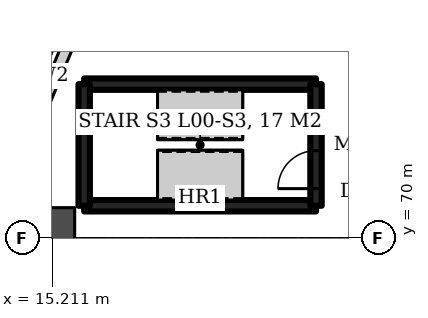
"""IFC4 building model, lengths in metres.
Left out: names, types, materials, properties, quantities, classifications, styles, units other than length and angle.
Written with IfcOpenShell. Run it as: python <this file> out.ifc"""

import sys

from ifc_helpers import new_model, si_unit, direction, frame, frame_2d, origin, origin_2d, place, context, subcontext, project, spatial, rectangle, extrude, element, fill, save


model = new_model("IFC4")
c1 = context("Model", 3, precision=1e-05, world=origin(), true_north=direction((0.0, 1.0)))
c2 = subcontext(c1, "Body", "Model", "MODEL_VIEW")
j1 = project(units=[si_unit("LENGTHUNIT", "METRE"), si_unit("PLANEANGLEUNIT", "RADIAN")], contexts=[c1])
p1 = place(None, origin())
s1 = spatial("IfcSite", under=j1, at=p1, CompositionType="ELEMENT")
p2 = place(p1, origin())
s2 = spatial("IfcBuilding", under=s1, at=p2, CompositionType="ELEMENT")
p3 = place(p2, origin())
s3 = spatial("IfcBuildingStorey", under=s2, at=p3, CompositionType="ELEMENT", Elevation=0.0)
p4 = place(p3, frame((15.0, 70.0, 0.0), z_axis=(0.0, 0.0, 1.0), x_axis=(1.0, 0.0, 0.0)))
e1 = element("IfcColumn", 1, at=p4, inside=s3, PredefinedType="COLUMN", context=c2, shape_type="SweptSolid", body=[
    extrude(rectangle(XDim=1.6, YDim=1.6, at=origin_2d()), origin(), (0.0, 0.0, 1.0), 6.0),
])
p5 = place(p3, frame((15.734, 75.35, 0.0), z_axis=(0.0, 0.0, 1.0), x_axis=(-0.382709424419, -0.923868765822, 0.0)))
e2 = element("IfcWall", 2, at=p5, inside=s3, PredefinedType="SOLIDWALL", context=c2, shape_type="SweptSolid", body=[
    extrude(rectangle(XDim=2.793, YDim=0.3, at=frame_2d((1.397, 0.0))), origin(), (0.0, 0.0, 1.0), 5.7),
])
for number, where, z_axis, x_axis in (
    (3, (16.05, 70.85, 0.0), (0.0, 0.0, 1.0), (1.0, 0.0, 0.0)),
    (4, (16.05, 74.05, 0.0), (0.0, 0.0, 1.0), (1.0, 0.0, 0.0)),
):
    element("IfcWall", number, at=place(p3, frame(where, z_axis=z_axis, x_axis=x_axis)), inside=s3, PredefinedType="SHEAR", context=c2, shape_type="SweptSolid", body=[
        extrude(rectangle(XDim=6.1, YDim=0.3, at=frame_2d((3.05, 0.0))), origin(), (0.0, 0.0, 1.0), 6.0),
    ])
p6 = place(p3, frame((16.05, 70.85, 0.0), z_axis=(0.0, 0.0, 1.0), x_axis=(0.0, 1.0, 0.0)))
e5 = element("IfcWall", 5, at=p6, inside=s3, PredefinedType="SHEAR", context=c2, shape_type="SweptSolid", body=[
    extrude(rectangle(XDim=3.2, YDim=0.3, at=frame_2d((1.6, 0.0))), origin(), (0.0, 0.0, 1.0), 6.0),
])
p7 = place(p3, frame((22.15, 70.85, 0.0), z_axis=(0.0, 0.0, 1.0), x_axis=(0.0, 1.0, 0.0)))
e6 = element("IfcWall", 6, at=p7, inside=s3, PredefinedType="SHEAR", context=c2, shape_type="SweptSolid", body=[
    extrude(rectangle(XDim=3.2, YDim=0.3, at=frame_2d((1.6, 0.0))), origin(), (0.0, 0.0, 1.0), 6.0),
])
p8 = place(p7, frame((0.45, 0.0, 0.0)))
e7 = element("IfcOpeningElement", 7, at=p8, cuts=e6, PredefinedType="OPENING", context=c2, shape_type="SweptSolid", body=[
    extrude(rectangle(XDim=1.0, YDim=2.1, at=frame_2d((0.5, 1.05))), frame((0.0, 0.16, 0.0), z_axis=(0.0, -1.0, 0.0), x_axis=(1.0, 0.0, 0.0)), (0.0, 0.0, 1.0), 0.32),
])
p9 = place(p8, origin())
e8 = element("IfcDoor", 8, at=p9, inside=s3, OperationType="SINGLE_SWING_LEFT", PredefinedType="DOOR", context=c2, shape_type="SweptSolid", body=[
    extrude(rectangle(XDim=1.0, YDim=2.1, at=frame_2d((0.5, 1.05))), frame((0.0, 0.025, 0.0), z_axis=(0.0, -1.0, 0.0), x_axis=(1.0, 0.0, 0.0)), (0.0, 0.0, 1.0), 0.05),
])
fill(e7, e8)
save(model, sys.argv[1])
